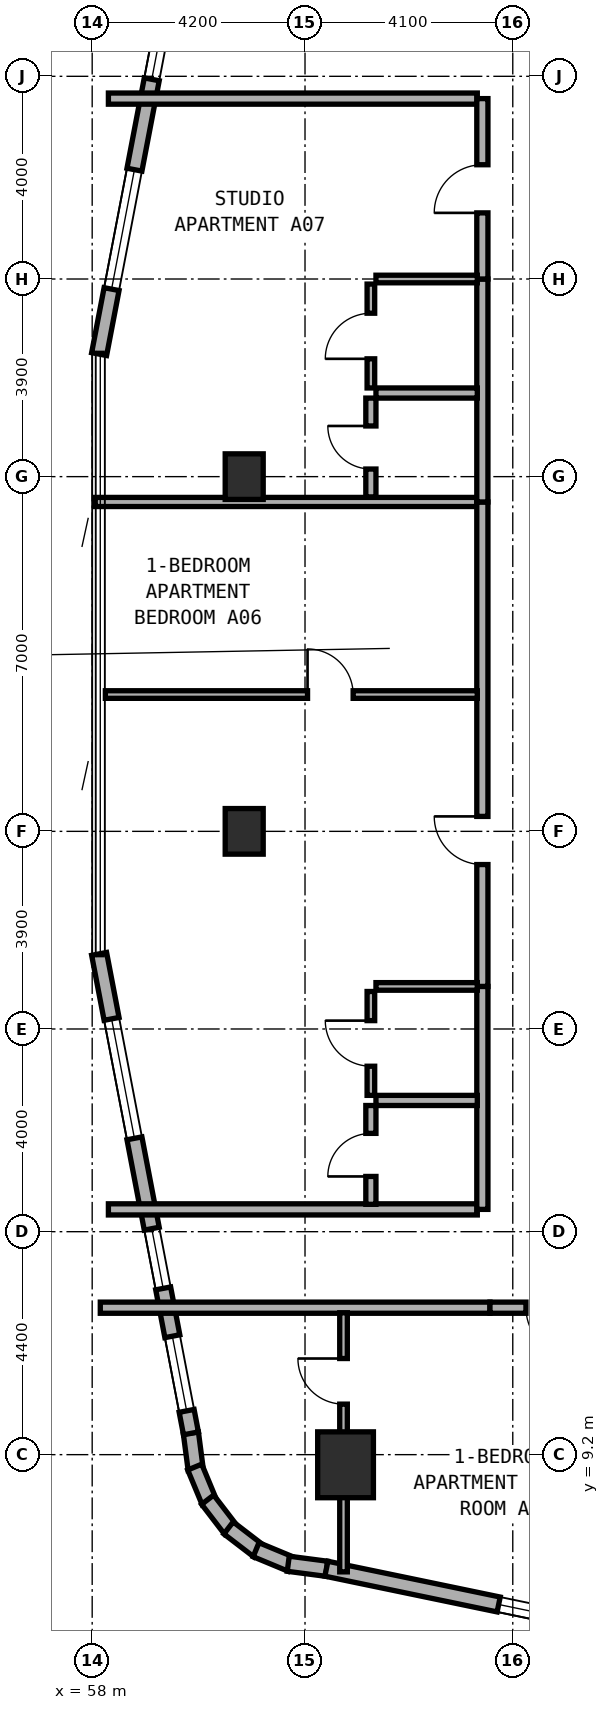
"""IFC4 building model, lengths in metres.
Left out: names, types, materials, properties, quantities, classifications, styles, units other than length and angle.
Written with IfcOpenShell. Run it as: python <this file> out.ifc"""

import sys

from ifc_helpers import new_model, si_unit, direction, frame, frame_2d, origin, origin_2d, place, context, subcontext, project, spatial, rectangle, extrude, element, fill, save


model = new_model("IFC4")
c1 = context("Model", 3, precision=1e-05, world=origin(), true_north=direction((0.0, 1.0)))
c2 = subcontext(c1, "Body", "Model", "MODEL_VIEW")
j1 = project(units=[si_unit("LENGTHUNIT", "METRE"), si_unit("PLANEANGLEUNIT", "RADIAN")], contexts=[c1])
p1 = place(None, origin())
s1 = spatial("IfcSite", under=j1, at=p1, CompositionType="ELEMENT")
p2 = place(p1, origin())
s2 = spatial("IfcBuilding", under=s1, at=p2, CompositionType="ELEMENT")
p3 = place(p2, frame((0.0, 0.0, 52.0)))
s3 = spatial("IfcBuildingStorey", under=s2, at=p3, CompositionType="ELEMENT", Elevation=52.0)
for number, where, z_axis, x_axis in (
    (1, (61.0, 21.5, 0.0), (0.0, 0.0, 1.0), (1.0, 0.0, 0.0)),
    (2, (61.0, 28.5, 0.0), (0.0, 0.0, 1.0), (1.0, 0.0, 0.0)),
):
    element("IfcColumn", number, at=place(p3, frame(where, z_axis=z_axis, x_axis=x_axis)), inside=s3, PredefinedType="COLUMN", context=c2, shape_type="SweptSolid", body=[
        extrude(rectangle(XDim=0.75, YDim=0.9, at=origin_2d()), origin(), (0.0, 0.0, 1.0), 3.5),
    ])
p4 = place(p3, frame((63.0, 9.0, 0.0), z_axis=(0.0, 0.0, 1.0), x_axis=(1.0, 0.0, 0.0)))
e3 = element("IfcColumn", 3, at=p4, inside=s3, PredefinedType="COLUMN", context=c2, shape_type="SweptSolid", body=[
    extrude(rectangle(XDim=1.1, YDim=1.3, at=origin_2d()), origin(), (0.0, 0.0, 1.0), 3.5),
])
p5 = place(p3, frame((59.948, 9.627, 0.0), z_axis=(0.0, 0.0, 1.0), x_axis=(0.130255288807, -0.991480488834, 0.0)))
e4 = element("IfcWall", 4, at=p5, inside=s3, PredefinedType="STANDARD", context=c2, shape_type="SweptSolid", body=[
    extrude(rectangle(XDim=0.729, YDim=0.3, at=frame_2d((0.365, 0.0))), origin(), (0.0, 0.0, 1.0), 3.25),
])
for number, where, z_axis, x_axis in (
    (5, (60.024, 8.955, 0.0), (0.0, 0.0, 1.0), (0.384, -0.924, 0.0)),
    (6, (60.279, 8.311, 0.0), (0.0, 0.0, 1.0), (0.608, -0.794, 0.0)),
    (7, (60.691, 7.754, 0.0), (0.0, 0.0, 1.0), (0.794, -0.608, 0.0)),
    (8, (61.234, 7.324, 0.0), (0.0, 0.0, 1.0), (0.924, -0.383, 0.0)),
):
    element("IfcWall", number, at=place(p3, frame(where, z_axis=z_axis, x_axis=x_axis)), inside=s3, PredefinedType="STANDARD", context=c2, shape_type="SweptSolid", body=[
        extrude(rectangle(XDim=0.746, YDim=0.3, at=frame_2d((0.373, 0.0))), origin(), (0.0, 0.0, 1.0), 3.25),
    ])
p6 = place(p3, frame((61.869, 7.047, 0.0), z_axis=(0.0, 0.0, 1.0), x_axis=(0.991559404866, -0.129653178221, 0.0)))
e9 = element("IfcWall", 9, at=p6, inside=s3, PredefinedType="STANDARD", context=c2, shape_type="SweptSolid", body=[
    extrude(rectangle(XDim=0.764, YDim=0.3, at=frame_2d((0.382, 0.0))), origin(), (0.0, 0.0, 1.0), 3.25),
])
p7 = place(p3, frame((62.622, 6.949, 0.0), z_axis=(0.0, 0.0, 1.0), x_axis=(0.979127260729, -0.203248142175, 0.0)))
e10 = element("IfcWall", 10, at=p7, inside=s3, PredefinedType="STANDARD", context=c2, shape_type="SweptSolid", body=[
    extrude(rectangle(XDim=8.92, YDim=0.3, at=frame_2d((4.46, 0.0))), origin(), (0.0, 0.0, 1.0), 3.25),
])
p8 = place(p7, frame((3.472, 0.0, 0.8)))
e11 = element("IfcOpeningElement", 11, at=p8, cuts=e10, PredefinedType="OPENING", context=c2, shape_type="SweptSolid", body=[
    extrude(rectangle(XDim=2.4, YDim=1.6, at=frame_2d((1.2, 0.8))), frame((0.0, 0.16, 0.0), z_axis=(0.0, -1.0, 0.0), x_axis=(1.0, 0.0, 0.0)), (0.0, 0.0, 1.0), 0.32),
])
p9 = place(p3, frame((59.949, 40.38, 0.0), z_axis=(0.0, 0.0, 1.0), x_axis=(-0.188087874316, -0.982152203854, 0.0)))
e12 = element("IfcWall", 12, at=p9, inside=s3, PredefinedType="STANDARD", context=c2, shape_type="SweptSolid", body=[
    extrude(rectangle(XDim=9.634, YDim=0.3, at=frame_2d((4.817, 0.0))), origin(), (0.0, 0.0, 1.0), 3.25),
])
p10 = place(p9, frame((0.452, 0.0, 0.85)))
e13 = element("IfcOpeningElement", 13, at=p10, cuts=e12, PredefinedType="OPENING", context=c2, shape_type="SweptSolid", body=[
    extrude(rectangle(XDim=1.5, YDim=1.5, at=frame_2d((0.75, 0.75))), frame((0.0, 0.16, 0.0), z_axis=(0.0, -1.0, 0.0), x_axis=(1.0, 0.0, 0.0)), (0.0, 0.0, 1.0), 0.32),
])
p11 = place(p9, frame((2.913, 0.0, 0.85)))
e14 = element("IfcOpeningElement", 14, at=p11, cuts=e12, PredefinedType="OPENING", context=c2, shape_type="SweptSolid", body=[
    extrude(rectangle(XDim=1.2, YDim=1.5, at=frame_2d((0.6, 0.75))), frame((0.0, 0.16, 0.0), z_axis=(0.0, -1.0, 0.0), x_axis=(1.0, 0.0, 0.0)), (0.0, 0.0, 1.0), 0.32),
])
p12 = place(p9, frame((5.928, 0.0, 0.8)))
e15 = element("IfcOpeningElement", 15, at=p12, cuts=e12, PredefinedType="OPENING", context=c2, shape_type="SweptSolid", body=[
    extrude(rectangle(XDim=2.4, YDim=1.6, at=frame_2d((1.2, 0.8))), frame((0.0, 0.16, 0.0), z_axis=(0.0, -1.0, 0.0), x_axis=(1.0, 0.0, 0.0)), (0.0, 0.0, 1.0), 0.32),
])
p13 = place(p3, frame((58.137, 19.082, 0.0), z_axis=(0.0, 0.0, 1.0), x_axis=(0.188087874316, -0.982152203854, 0.0)))
e16 = element("IfcWall", 16, at=p13, inside=s3, PredefinedType="STANDARD", context=c2, shape_type="SweptSolid", body=[
    extrude(rectangle(XDim=9.634, YDim=0.3, at=frame_2d((4.817, 0.0))), origin(), (0.0, 0.0, 1.0), 3.25),
])
p14 = place(p13, frame((1.306, 0.0, 0.8)))
e17 = element("IfcOpeningElement", 17, at=p14, cuts=e16, PredefinedType="OPENING", context=c2, shape_type="SweptSolid", body=[
    extrude(rectangle(XDim=2.4, YDim=1.6, at=frame_2d((1.2, 0.8))), frame((0.0, 0.16, 0.0), z_axis=(0.0, -1.0, 0.0), x_axis=(1.0, 0.0, 0.0)), (0.0, 0.0, 1.0), 0.32),
])
p15 = place(p13, frame((5.521, 0.0, 0.85)))
e18 = element("IfcOpeningElement", 18, at=p15, cuts=e16, PredefinedType="OPENING", context=c2, shape_type="SweptSolid", body=[
    extrude(rectangle(XDim=1.2, YDim=1.5, at=frame_2d((0.6, 0.75))), frame((0.0, 0.16, 0.0), z_axis=(0.0, -1.0, 0.0), x_axis=(1.0, 0.0, 0.0)), (0.0, 0.0, 1.0), 0.32),
])
p16 = place(p13, frame((7.682, 0.0, 0.85)))
e19 = element("IfcOpeningElement", 19, at=p16, cuts=e16, PredefinedType="OPENING", context=c2, shape_type="SweptSolid", body=[
    extrude(rectangle(XDim=1.5, YDim=1.5, at=frame_2d((0.75, 0.75))), frame((0.0, 0.16, 0.0), z_axis=(0.0, -1.0, 0.0), x_axis=(1.0, 0.0, 0.0)), (0.0, 0.0, 1.0), 0.32),
])
p17 = place(p3, frame((58.16, 12.1, 0.0), z_axis=(0.0, 0.0, 1.0), x_axis=(1.0, 0.0, 0.0)))
e20 = element("IfcWall", 20, at=p17, inside=s3, PredefinedType="SOLIDWALL", context=c2, shape_type="SweptSolid", body=[
    extrude(rectangle(XDim=7.69, YDim=0.22, at=frame_2d((3.845, 0.0))), origin(), (0.0, 0.0, 1.0), 2.865),
])
p18 = place(p3, frame((65.85, 12.1, 0.0), z_axis=(0.0, 0.0, 1.0), x_axis=(1.0, 0.0, 0.0)))
e21 = element("IfcWall", 21, at=p18, inside=s3, PredefinedType="SOLIDWALL", context=c2, shape_type="SweptSolid", body=[
    extrude(rectangle(XDim=2.37, YDim=0.22, at=frame_2d((1.185, 0.0))), origin(), (0.0, 0.0, 1.0), 3.22),
])
p19 = place(p18, frame((0.71, 0.0, 0.0)))
e22 = element("IfcOpeningElement", 22, at=p19, cuts=e21, PredefinedType="OPENING", context=c2, shape_type="SweptSolid", body=[
    extrude(rectangle(XDim=0.95, YDim=2.1, at=frame_2d((0.475, 1.05))), frame((0.0, 0.12, 0.0), z_axis=(0.0, -1.0, 0.0), x_axis=(1.0, 0.0, 0.0)), (0.0, 0.0, 1.0), 0.24),
])
p20 = place(p3, frame((62.96, 6.887, 0.0), z_axis=(0.0, 0.0, 1.0), x_axis=(0.0, 1.0, 0.0)))
e23 = element("IfcWall", 23, at=p20, inside=s3, PredefinedType="PARTITIONING", context=c2, shape_type="SweptSolid", body=[
    extrude(rectangle(XDim=5.113, YDim=0.15, at=frame_2d((2.557, 0.0))), origin(), (0.0, 0.0, 1.0), 2.865),
])
p21 = place(p20, frame((3.31, 0.0, 0.0)))
e24 = element("IfcOpeningElement", 24, at=p21, cuts=e23, PredefinedType="OPENING", context=c2, shape_type="SweptSolid", body=[
    extrude(rectangle(XDim=0.9, YDim=2.1, at=frame_2d((0.45, 1.05))), frame((0.0, 0.085, 0.0), z_axis=(0.0, -1.0, 0.0), x_axis=(1.0, 0.0, 0.0)), (0.0, 0.0, 1.0), 0.17),
])
for number, where, z_axis, x_axis in (
    (25, (58.32, 14.04, 0.0), (0.0, 0.0, 1.0), (1.0, 0.0, 0.0)),
    (26, (58.32, 35.96, 0.0), (0.0, 0.0, 1.0), (1.0, 0.0, 0.0)),
):
    element("IfcWall", number, at=place(p3, frame(where, z_axis=z_axis, x_axis=x_axis)), inside=s3, PredefinedType="SOLIDWALL", context=c2, shape_type="SweptSolid", body=[
        extrude(rectangle(XDim=7.28, YDim=0.22, at=frame_2d((3.64, 0.0))), origin(), (0.0, 0.0, 1.0), 2.865),
    ])
p22 = place(p3, frame((58.06, 28.0, 0.0), z_axis=(0.0, 0.0, 1.0), x_axis=(1.0, 0.0, 0.0)))
e27 = element("IfcWall", 27, at=p22, inside=s3, PredefinedType="SOLIDWALL", context=c2, shape_type="SweptSolid", body=[
    extrude(rectangle(XDim=7.64, YDim=0.18, at=frame_2d((3.82, 0.0))), origin(), (0.0, 0.0, 1.0), 2.865),
])
p23 = place(p3, frame((65.7, 14.04, 0.0), z_axis=(0.0, 0.0, 1.0), x_axis=(0.0, 1.0, 0.0)))
e28 = element("IfcWall", 28, at=p23, inside=s3, PredefinedType="SOLIDWALL", context=c2, shape_type="SweptSolid", body=[
    extrude(rectangle(XDim=4.4, YDim=0.22, at=frame_2d((2.2, 0.0))), origin(), (0.0, 0.0, 1.0), 3.22),
])
p24 = place(p3, frame((65.7, 18.44, 0.0), z_axis=(0.0, 0.0, 1.0), x_axis=(0.0, 1.0, 0.0)))
e29 = element("IfcWall", 29, at=p24, inside=s3, PredefinedType="SOLIDWALL", context=c2, shape_type="SweptSolid", body=[
    extrude(rectangle(XDim=9.56, YDim=0.22, at=frame_2d((4.78, 0.0))), origin(), (0.0, 0.0, 1.0), 2.725),
])
p25 = place(p24, frame((2.405, 0.0, 0.0)))
e30 = element("IfcOpeningElement", 30, at=p25, cuts=e29, PredefinedType="OPENING", context=c2, shape_type="SweptSolid", body=[
    extrude(rectangle(XDim=0.95, YDim=2.1, at=frame_2d((0.475, 1.05))), frame((0.0, 0.12, 0.0), z_axis=(0.0, -1.0, 0.0), x_axis=(1.0, 0.0, 0.0)), (0.0, 0.0, 1.0), 0.24),
])
p26 = place(p3, frame((58.26, 24.2, 0.0), z_axis=(0.0, 0.0, 1.0), x_axis=(1.0, 0.0, 0.0)))
e31 = element("IfcWall", 31, at=p26, inside=s3, PredefinedType="PARTITIONING", context=c2, shape_type="SweptSolid", body=[
    extrude(rectangle(XDim=7.34, YDim=0.15, at=frame_2d((3.67, 0.0))), origin(), (0.0, 0.0, 1.0), 2.865),
])
p27 = place(p26, frame((3.99, 0.0, 0.0)))
e32 = element("IfcOpeningElement", 32, at=p27, cuts=e31, PredefinedType="OPENING", context=c2, shape_type="SweptSolid", body=[
    extrude(rectangle(XDim=0.9, YDim=2.1, at=frame_2d((0.45, 1.05))), frame((0.0, 0.085, 0.0), z_axis=(0.0, -1.0, 0.0), x_axis=(1.0, 0.0, 0.0)), (0.0, 0.0, 1.0), 0.17),
])
p28 = place(p3, frame((63.6, 16.19, 0.0), z_axis=(0.0, 0.0, 1.0), x_axis=(1.0, 0.0, 0.0)))
e33 = element("IfcWall", 33, at=p28, inside=s3, PredefinedType="PLUMBINGWALL", context=c2, shape_type="SweptSolid", body=[
    extrude(rectangle(XDim=2.0, YDim=0.2, at=frame_2d((1.0, 0.0))), origin(), (0.0, 0.0, 1.0), 3.22),
])
p29 = place(p3, frame((63.6, 18.44, 0.0), z_axis=(0.0, 0.0, 1.0), x_axis=(1.0, 0.0, 0.0)))
e34 = element("IfcWall", 34, at=p29, inside=s3, PredefinedType="PARTITIONING", context=c2, shape_type="SweptSolid", body=[
    extrude(rectangle(XDim=2.0, YDim=0.15, at=frame_2d((1.0, 0.0))), origin(), (0.0, 0.0, 1.0), 3.22),
])
p30 = place(p3, frame((63.5, 14.14, 0.0), z_axis=(0.0, 0.0, 1.0), x_axis=(0.0, 1.0, 0.0)))
e35 = element("IfcWall", 35, at=p30, inside=s3, PredefinedType="PLUMBINGWALL", context=c2, shape_type="SweptSolid", body=[
    extrude(rectangle(XDim=1.95, YDim=0.2, at=frame_2d((0.975, 0.0))), origin(), (0.0, 0.0, 1.0), 3.22),
])
p31 = place(p30, frame((0.55, 0.0, 0.0)))
e36 = element("IfcOpeningElement", 36, at=p31, cuts=e35, PredefinedType="OPENING", context=c2, shape_type="SweptSolid", body=[
    extrude(rectangle(XDim=0.85, YDim=2.1, at=frame_2d((0.425, 1.05))), frame((0.0, 0.11, 0.0), z_axis=(0.0, -1.0, 0.0), x_axis=(1.0, 0.0, 0.0)), (0.0, 0.0, 1.0), 0.22),
])
p32 = place(p3, frame((63.5, 16.29, 0.0), z_axis=(0.0, 0.0, 1.0), x_axis=(0.0, 1.0, 0.0)))
e37 = element("IfcWall", 37, at=p32, inside=s3, PredefinedType="PARTITIONING", context=c2, shape_type="SweptSolid", body=[
    extrude(rectangle(XDim=2.05, YDim=0.15, at=frame_2d((1.025, 0.0))), origin(), (0.0, 0.0, 1.0), 3.22),
])
p33 = place(p32, frame((0.575, 0.0, 0.0)))
e38 = element("IfcOpeningElement", 38, at=p33, cuts=e37, PredefinedType="OPENING", context=c2, shape_type="SweptSolid", body=[
    extrude(rectangle(XDim=0.9, YDim=2.1, at=frame_2d((0.45, 1.05))), frame((0.0, 0.085, 0.0), z_axis=(0.0, -1.0, 0.0), x_axis=(1.0, 0.0, 0.0)), (0.0, 0.0, 1.0), 0.17),
])
p34 = place(p3, frame((65.7, 28.0, 0.0), z_axis=(0.0, 0.0, 1.0), x_axis=(0.0, 1.0, 0.0)))
e39 = element("IfcWall", 39, at=p34, inside=s3, PredefinedType="SOLIDWALL", context=c2, shape_type="SweptSolid", body=[
    extrude(rectangle(XDim=4.4, YDim=0.22, at=frame_2d((2.2, 0.0))), origin(), (0.0, 0.0, 1.0), 2.725),
])
p35 = place(p3, frame((65.7, 32.4, 0.0), z_axis=(0.0, 0.0, 1.0), x_axis=(0.0, 1.0, 0.0)))
e40 = element("IfcWall", 40, at=p35, inside=s3, PredefinedType="SOLIDWALL", context=c2, shape_type="SweptSolid", body=[
    extrude(rectangle(XDim=3.56, YDim=0.22, at=frame_2d((1.78, 0.0))), origin(), (0.0, 0.0, 1.0), 3.22),
])
p36 = place(p35, frame((1.305, 0.0, 0.0)))
e41 = element("IfcOpeningElement", 41, at=p36, cuts=e40, PredefinedType="OPENING", context=c2, shape_type="SweptSolid", body=[
    extrude(rectangle(XDim=0.95, YDim=2.1, at=frame_2d((0.475, 1.05))), frame((0.0, 0.12, 0.0), z_axis=(0.0, -1.0, 0.0), x_axis=(1.0, 0.0, 0.0)), (0.0, 0.0, 1.0), 0.24),
])
p37 = place(p3, frame((63.6, 30.15, 0.0), z_axis=(0.0, 0.0, 1.0), x_axis=(1.0, 0.0, 0.0)))
e42 = element("IfcWall", 42, at=p37, inside=s3, PredefinedType="PLUMBINGWALL", context=c2, shape_type="SweptSolid", body=[
    extrude(rectangle(XDim=2.0, YDim=0.2, at=frame_2d((1.0, 0.0))), origin(), (0.0, 0.0, 1.0), 3.22),
])
p38 = place(p3, frame((63.6, 32.4, 0.0), z_axis=(0.0, 0.0, 1.0), x_axis=(1.0, 0.0, 0.0)))
e43 = element("IfcWall", 43, at=p38, inside=s3, PredefinedType="PARTITIONING", context=c2, shape_type="SweptSolid", body=[
    extrude(rectangle(XDim=2.0, YDim=0.15, at=frame_2d((1.0, 0.0))), origin(), (0.0, 0.0, 1.0), 3.22),
])
p39 = place(p3, frame((63.5, 28.1, 0.0), z_axis=(0.0, 0.0, 1.0), x_axis=(0.0, 1.0, 0.0)))
e44 = element("IfcWall", 44, at=p39, inside=s3, PredefinedType="PLUMBINGWALL", context=c2, shape_type="SweptSolid", body=[
    extrude(rectangle(XDim=1.95, YDim=0.2, at=frame_2d((0.975, 0.0))), origin(), (0.0, 0.0, 1.0), 2.725),
])
p40 = place(p39, frame((0.55, 0.0, 0.0)))
e45 = element("IfcOpeningElement", 45, at=p40, cuts=e44, PredefinedType="OPENING", context=c2, shape_type="SweptSolid", body=[
    extrude(rectangle(XDim=0.85, YDim=2.1, at=frame_2d((0.425, 1.05))), frame((0.0, 0.11, 0.0), z_axis=(0.0, -1.0, 0.0), x_axis=(1.0, 0.0, 0.0)), (0.0, 0.0, 1.0), 0.22),
])
p41 = place(p3, frame((63.5, 30.25, 0.0), z_axis=(0.0, 0.0, 1.0), x_axis=(0.0, 1.0, 0.0)))
e46 = element("IfcWall", 46, at=p41, inside=s3, PredefinedType="PARTITIONING", context=c2, shape_type="SweptSolid", body=[
    extrude(rectangle(XDim=2.05, YDim=0.15, at=frame_2d((1.025, 0.0))), origin(), (0.0, 0.0, 1.0), 3.22),
])
p42 = place(p41, frame((0.575, 0.0, 0.0)))
e47 = element("IfcOpeningElement", 47, at=p42, cuts=e46, PredefinedType="OPENING", context=c2, shape_type="SweptSolid", body=[
    extrude(rectangle(XDim=0.9, YDim=2.1, at=frame_2d((0.45, 1.05))), frame((0.0, 0.085, 0.0), z_axis=(0.0, -1.0, 0.0), x_axis=(1.0, 0.0, 0.0)), (0.0, 0.0, 1.0), 0.17),
])
p43 = place(p8, origin())
e48 = element("IfcWindow", 48, at=p43, inside=s3, PartitioningType="SINGLE_PANEL", PredefinedType="WINDOW", context=c2, shape_type="SweptSolid", body=[
    extrude(rectangle(XDim=2.4, YDim=1.6, at=frame_2d((1.2, 0.8))), frame((0.0, 0.03, 0.0), z_axis=(0.0, -1.0, 0.0), x_axis=(1.0, 0.0, 0.0)), (0.0, 0.0, 1.0), 0.06),
])
fill(e11, e48)
p44 = place(p11, origin())
e49 = element("IfcWindow", 49, at=p44, inside=s3, PartitioningType="SINGLE_PANEL", PredefinedType="WINDOW", context=c2, shape_type="SweptSolid", body=[
    extrude(rectangle(XDim=1.2, YDim=1.5, at=frame_2d((0.6, 0.75))), frame((0.0, 0.03, 0.0), z_axis=(0.0, -1.0, 0.0), x_axis=(1.0, 0.0, 0.0)), (0.0, 0.0, 1.0), 0.06),
])
fill(e14, e49)
p45 = place(p12, origin())
e50 = element("IfcWindow", 50, at=p45, inside=s3, PartitioningType="SINGLE_PANEL", PredefinedType="WINDOW", context=c2, shape_type="SweptSolid", body=[
    extrude(rectangle(XDim=2.4, YDim=1.6, at=frame_2d((1.2, 0.8))), frame((0.0, 0.03, 0.0), z_axis=(0.0, -1.0, 0.0), x_axis=(1.0, 0.0, 0.0)), (0.0, 0.0, 1.0), 0.06),
])
fill(e15, e50)
p46 = place(p14, origin())
e51 = element("IfcWindow", 51, at=p46, inside=s3, PartitioningType="SINGLE_PANEL", PredefinedType="WINDOW", context=c2, shape_type="SweptSolid", body=[
    extrude(rectangle(XDim=2.4, YDim=1.6, at=frame_2d((1.2, 0.8))), frame((0.0, 0.03, 0.0), z_axis=(0.0, -1.0, 0.0), x_axis=(1.0, 0.0, 0.0)), (0.0, 0.0, 1.0), 0.06),
])
fill(e17, e51)
p47 = place(p15, origin())
e52 = element("IfcWindow", 52, at=p47, inside=s3, PartitioningType="SINGLE_PANEL", PredefinedType="WINDOW", context=c2, shape_type="SweptSolid", body=[
    extrude(rectangle(XDim=1.2, YDim=1.5, at=frame_2d((0.6, 0.75))), frame((0.0, 0.03, 0.0), z_axis=(0.0, -1.0, 0.0), x_axis=(1.0, 0.0, 0.0)), (0.0, 0.0, 1.0), 0.06),
])
fill(e18, e52)
p48 = place(p16, origin())
e53 = element("IfcWindow", 53, at=p48, inside=s3, PartitioningType="SINGLE_PANEL", PredefinedType="WINDOW", context=c2, shape_type="SweptSolid", body=[
    extrude(rectangle(XDim=1.5, YDim=1.5, at=frame_2d((0.75, 0.75))), frame((0.0, 0.03, 0.0), z_axis=(0.0, -1.0, 0.0), x_axis=(1.0, 0.0, 0.0)), (0.0, 0.0, 1.0), 0.06),
])
fill(e19, e53)
p49 = place(p19, frame((0.95, 0.0, 0.0), z_axis=(0.0, 0.0, 1.0), x_axis=(-1.0, 0.0, 0.0)))
e54 = element("IfcDoor", 54, at=p49, inside=s3, OperationType="SINGLE_SWING_LEFT", PredefinedType="DOOR", context=c2, shape_type="SweptSolid", body=[
    extrude(rectangle(XDim=0.95, YDim=2.1, at=frame_2d((0.475, 1.05))), frame((0.0, 0.025, 0.0), z_axis=(0.0, -1.0, 0.0), x_axis=(1.0, 0.0, 0.0)), (0.0, 0.0, 1.0), 0.05),
])
fill(e22, e54)
p50 = place(p21, origin())
e55 = element("IfcDoor", 55, at=p50, inside=s3, OperationType="SINGLE_SWING_RIGHT", PredefinedType="DOOR", context=c2, shape_type="SweptSolid", body=[
    extrude(rectangle(XDim=0.9, YDim=2.1, at=frame_2d((0.45, 1.05))), frame((0.0, 0.025, 0.0), z_axis=(0.0, -1.0, 0.0), x_axis=(1.0, 0.0, 0.0)), (0.0, 0.0, 1.0), 0.05),
])
fill(e24, e55)
p51 = place(p25, origin())
e56 = element("IfcDoor", 56, at=p51, inside=s3, OperationType="SINGLE_SWING_RIGHT", PredefinedType="DOOR", context=c2, shape_type="SweptSolid", body=[
    extrude(rectangle(XDim=0.95, YDim=2.1, at=frame_2d((0.475, 1.05))), frame((0.0, 0.025, 0.0), z_axis=(0.0, -1.0, 0.0), x_axis=(1.0, 0.0, 0.0)), (0.0, 0.0, 1.0), 0.05),
])
fill(e30, e56)
p52 = place(p27, origin())
e57 = element("IfcDoor", 57, at=p52, inside=s3, OperationType="SINGLE_SWING_LEFT", PredefinedType="DOOR", context=c2, shape_type="SweptSolid", body=[
    extrude(rectangle(XDim=0.9, YDim=2.1, at=frame_2d((0.45, 1.05))), frame((0.0, 0.025, 0.0), z_axis=(0.0, -1.0, 0.0), x_axis=(1.0, 0.0, 0.0)), (0.0, 0.0, 1.0), 0.05),
])
fill(e32, e57)
p53 = place(p31, origin())
e58 = element("IfcDoor", 58, at=p53, inside=s3, OperationType="SINGLE_SWING_LEFT", PredefinedType="DOOR", context=c2, shape_type="SweptSolid", body=[
    extrude(rectangle(XDim=0.85, YDim=2.1, at=frame_2d((0.425, 1.05))), frame((0.0, 0.025, 0.0), z_axis=(0.0, -1.0, 0.0), x_axis=(1.0, 0.0, 0.0)), (0.0, 0.0, 1.0), 0.05),
])
fill(e36, e58)
p54 = place(p33, origin())
e59 = element("IfcDoor", 59, at=p54, inside=s3, OperationType="SINGLE_SWING_RIGHT", PredefinedType="DOOR", context=c2, shape_type="SweptSolid", body=[
    extrude(rectangle(XDim=0.9, YDim=2.1, at=frame_2d((0.45, 1.05))), frame((0.0, 0.025, 0.0), z_axis=(0.0, -1.0, 0.0), x_axis=(1.0, 0.0, 0.0)), (0.0, 0.0, 1.0), 0.05),
])
fill(e38, e59)
p55 = place(p36, origin())
e60 = element("IfcDoor", 60, at=p55, inside=s3, OperationType="SINGLE_SWING_LEFT", PredefinedType="DOOR", context=c2, shape_type="SweptSolid", body=[
    extrude(rectangle(XDim=0.95, YDim=2.1, at=frame_2d((0.475, 1.05))), frame((0.0, 0.025, 0.0), z_axis=(0.0, -1.0, 0.0), x_axis=(1.0, 0.0, 0.0)), (0.0, 0.0, 1.0), 0.05),
])
fill(e41, e60)
p56 = place(p40, origin())
e61 = element("IfcDoor", 61, at=p56, inside=s3, OperationType="SINGLE_SWING_RIGHT", PredefinedType="DOOR", context=c2, shape_type="SweptSolid", body=[
    extrude(rectangle(XDim=0.85, YDim=2.1, at=frame_2d((0.425, 1.05))), frame((0.0, 0.025, 0.0), z_axis=(0.0, -1.0, 0.0), x_axis=(1.0, 0.0, 0.0)), (0.0, 0.0, 1.0), 0.05),
])
fill(e45, e61)
p57 = place(p42, origin())
e62 = element("IfcDoor", 62, at=p57, inside=s3, OperationType="SINGLE_SWING_LEFT", PredefinedType="DOOR", context=c2, shape_type="SweptSolid", body=[
    extrude(rectangle(XDim=0.9, YDim=2.1, at=frame_2d((0.45, 1.05))), frame((0.0, 0.025, 0.0), z_axis=(0.0, -1.0, 0.0), x_axis=(1.0, 0.0, 0.0)), (0.0, 0.0, 1.0), 0.05),
])
fill(e47, e62)
save(model, sys.argv[1])
